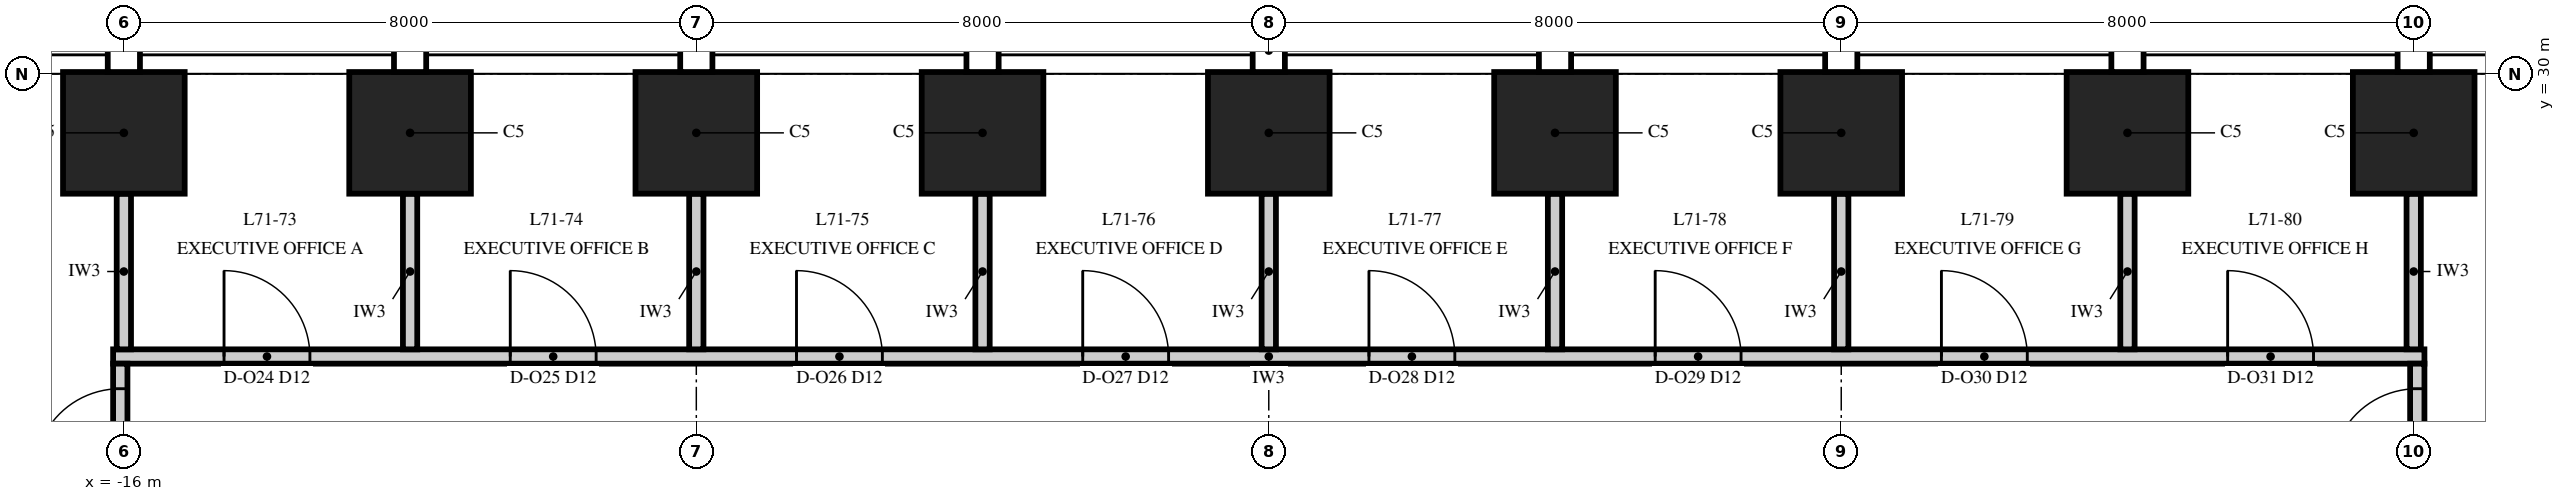
"""IFC4 building model, lengths in metres.
Left out: names, types, materials, properties, quantities, classifications, styles, units other than length and angle.
Written with IfcOpenShell. Run it as: python <this file> out.ifc"""

import sys

from ifc_helpers import new_model, si_unit, direction, frame, frame_2d, origin, origin_2d, place, context, subcontext, project, spatial, rectangle, extrude, element, fill, save


model = new_model("IFC4")
c1 = context("Model", 3, precision=1e-05, world=origin(), true_north=direction((0.0, 1.0)))
c2 = subcontext(c1, "Body", "Model", "MODEL_VIEW")
j1 = project(units=[si_unit("LENGTHUNIT", "METRE"), si_unit("PLANEANGLEUNIT", "RADIAN")], contexts=[c1])
p1 = place(None, origin())
s1 = spatial("IfcSite", under=j1, at=p1, CompositionType="ELEMENT")
p2 = place(p1, origin())
s2 = spatial("IfcBuilding", under=s1, at=p2, CompositionType="ELEMENT")
p3 = place(p2, frame((0.0, 0.0, 304.0)))
s3 = spatial("IfcBuildingStorey", under=s2, at=p3, CompositionType="ELEMENT", Elevation=304.0)
for number, where, z_axis, x_axis in (
    (1, (16.0, 29.175, 0.0), (0.0, 0.0, 1.0), (-1.0, 0.0, 0.0)),
    (2, (12.0, 29.175, 0.0), (0.0, 0.0, 1.0), (-1.0, 0.0, 0.0)),
    (3, (8.0, 29.175, 0.0), (0.0, 0.0, 1.0), (-1.0, 0.0, 0.0)),
    (4, (4.0, 29.175, 0.0), (0.0, 0.0, 1.0), (-1.0, 0.0, 0.0)),
    (5, (0.0, 29.175, 0.0), (0.0, 0.0, 1.0), (-1.0, 0.0, 0.0)),
    (6, (-4.0, 29.175, 0.0), (0.0, 0.0, 1.0), (-1.0, 0.0, 0.0)),
    (7, (-8.0, 29.175, 0.0), (0.0, 0.0, 1.0), (-1.0, 0.0, 0.0)),
    (8, (-12.0, 29.175, 0.0), (0.0, 0.0, 1.0), (-1.0, 0.0, 0.0)),
    (9, (-16.0, 29.175, 0.0), (0.0, 0.0, 1.0), (-1.0, 0.0, 0.0)),
):
    element("IfcColumn", number, at=place(p3, frame(where, z_axis=z_axis, x_axis=x_axis)), inside=s3, PredefinedType="COLUMN", context=c2, shape_type="SweptSolid", body=[
        extrude(rectangle(XDim=1.7, YDim=1.7, at=origin_2d()), origin(), (0.0, 0.0, 1.0), 4.0),
    ])
p4 = place(p3, frame((-16.15, 26.05, 0.0), z_axis=(0.0, 0.0, 1.0), x_axis=(1.0, 0.0, 0.0)))
e10 = element("IfcWall", 10, at=p4, inside=s3, PredefinedType="PARTITIONING", context=c2, shape_type="SweptSolid", body=[
    extrude(rectangle(XDim=32.3, YDim=0.2, at=frame_2d((16.15, 0.0))), origin(), (0.0, 0.0, 1.0), 3.418),
])
p5 = place(p4, frame((1.55, 0.0, 0.0)))
e11 = element("IfcOpeningElement", 11, at=p5, cuts=e10, PredefinedType="OPENING", context=c2, shape_type="SweptSolid", body=[
    extrude(rectangle(XDim=1.2, YDim=2.4, at=frame_2d((0.6, 1.2))), frame((0.0, 0.115, 0.0), z_axis=(0.0, -1.0, 0.0), x_axis=(1.0, 0.0, 0.0)), (0.0, 0.0, 1.0), 0.23),
])
p6 = place(p4, frame((5.55, 0.0, 0.0)))
e12 = element("IfcOpeningElement", 12, at=p6, cuts=e10, PredefinedType="OPENING", context=c2, shape_type="SweptSolid", body=[
    extrude(rectangle(XDim=1.2, YDim=2.4, at=frame_2d((0.6, 1.2))), frame((0.0, 0.115, 0.0), z_axis=(0.0, -1.0, 0.0), x_axis=(1.0, 0.0, 0.0)), (0.0, 0.0, 1.0), 0.23),
])
p7 = place(p4, frame((9.55, 0.0, 0.0)))
e13 = element("IfcOpeningElement", 13, at=p7, cuts=e10, PredefinedType="OPENING", context=c2, shape_type="SweptSolid", body=[
    extrude(rectangle(XDim=1.2, YDim=2.4, at=frame_2d((0.6, 1.2))), frame((0.0, 0.115, 0.0), z_axis=(0.0, -1.0, 0.0), x_axis=(1.0, 0.0, 0.0)), (0.0, 0.0, 1.0), 0.23),
])
p8 = place(p4, frame((13.55, 0.0, 0.0)))
e14 = element("IfcOpeningElement", 14, at=p8, cuts=e10, PredefinedType="OPENING", context=c2, shape_type="SweptSolid", body=[
    extrude(rectangle(XDim=1.2, YDim=2.4, at=frame_2d((0.6, 1.2))), frame((0.0, 0.115, 0.0), z_axis=(0.0, -1.0, 0.0), x_axis=(1.0, 0.0, 0.0)), (0.0, 0.0, 1.0), 0.23),
])
p9 = place(p4, frame((17.55, 0.0, 0.0)))
e15 = element("IfcOpeningElement", 15, at=p9, cuts=e10, PredefinedType="OPENING", context=c2, shape_type="SweptSolid", body=[
    extrude(rectangle(XDim=1.2, YDim=2.4, at=frame_2d((0.6, 1.2))), frame((0.0, 0.115, 0.0), z_axis=(0.0, -1.0, 0.0), x_axis=(1.0, 0.0, 0.0)), (0.0, 0.0, 1.0), 0.23),
])
p10 = place(p4, frame((21.55, 0.0, 0.0)))
e16 = element("IfcOpeningElement", 16, at=p10, cuts=e10, PredefinedType="OPENING", context=c2, shape_type="SweptSolid", body=[
    extrude(rectangle(XDim=1.2, YDim=2.4, at=frame_2d((0.6, 1.2))), frame((0.0, 0.115, 0.0), z_axis=(0.0, -1.0, 0.0), x_axis=(1.0, 0.0, 0.0)), (0.0, 0.0, 1.0), 0.23),
])
p11 = place(p4, frame((25.55, 0.0, 0.0)))
e17 = element("IfcOpeningElement", 17, at=p11, cuts=e10, PredefinedType="OPENING", context=c2, shape_type="SweptSolid", body=[
    extrude(rectangle(XDim=1.2, YDim=2.4, at=frame_2d((0.6, 1.2))), frame((0.0, 0.115, 0.0), z_axis=(0.0, -1.0, 0.0), x_axis=(1.0, 0.0, 0.0)), (0.0, 0.0, 1.0), 0.23),
])
p12 = place(p4, frame((29.55, 0.0, 0.0)))
e18 = element("IfcOpeningElement", 18, at=p12, cuts=e10, PredefinedType="OPENING", context=c2, shape_type="SweptSolid", body=[
    extrude(rectangle(XDim=1.2, YDim=2.4, at=frame_2d((0.6, 1.2))), frame((0.0, 0.115, 0.0), z_axis=(0.0, -1.0, 0.0), x_axis=(1.0, 0.0, 0.0)), (0.0, 0.0, 1.0), 0.23),
])
p13 = place(p3, frame((-16.05, 4.05, 0.0), z_axis=(0.0, 0.0, 1.0), x_axis=(0.0, 1.0, 0.0)))
e19 = element("IfcWall", 19, at=p13, inside=s3, PredefinedType="PARTITIONING", context=c2, shape_type="SweptSolid", body=[
    extrude(rectangle(XDim=21.9, YDim=0.2, at=frame_2d((10.95, 0.0))), origin(), (0.0, 0.0, 1.0), 2.842),
])
p14 = place(p13, frame((0.25, 0.0, 0.0)))
e20 = element("IfcOpeningElement", 20, at=p14, cuts=e19, PredefinedType="OPENING", context=c2, shape_type="SweptSolid", body=[
    extrude(rectangle(XDim=1.2, YDim=2.4, at=frame_2d((0.6, 1.2))), frame((0.0, 0.115, 0.0), z_axis=(0.0, -1.0, 0.0), x_axis=(1.0, 0.0, 0.0)), (0.0, 0.0, 1.0), 0.23),
])
p15 = place(p13, frame((7.35, 0.0, 0.0)))
e21 = element("IfcOpeningElement", 21, at=p15, cuts=e19, PredefinedType="OPENING", context=c2, shape_type="SweptSolid", body=[
    extrude(rectangle(XDim=1.2, YDim=2.4, at=frame_2d((0.6, 1.2))), frame((0.0, 0.115, 0.0), z_axis=(0.0, -1.0, 0.0), x_axis=(1.0, 0.0, 0.0)), (0.0, 0.0, 1.0), 0.23),
])
p16 = place(p13, frame((20.35, 0.0, 0.0)))
e22 = element("IfcOpeningElement", 22, at=p16, cuts=e19, PredefinedType="OPENING", context=c2, shape_type="SweptSolid", body=[
    extrude(rectangle(XDim=1.2, YDim=2.4, at=frame_2d((0.6, 1.2))), frame((0.0, 0.115, 0.0), z_axis=(0.0, -1.0, 0.0), x_axis=(1.0, 0.0, 0.0)), (0.0, 0.0, 1.0), 0.23),
])
for number, where, z_axis, x_axis in (
    (23, (-16.0, 26.15, 0.0), (0.0, 0.0, 1.0), (0.0, 1.0, 0.0)),
    (24, (-12.0, 26.15, 0.0), (0.0, 0.0, 1.0), (0.0, 1.0, 0.0)),
    (25, (-8.0, 26.15, 0.0), (0.0, 0.0, 1.0), (0.0, 1.0, 0.0)),
    (26, (-4.0, 26.15, 0.0), (0.0, 0.0, 1.0), (0.0, 1.0, 0.0)),
    (27, (0.0, 26.15, 0.0), (0.0, 0.0, 1.0), (0.0, 1.0, 0.0)),
    (28, (4.0, 26.15, 0.0), (0.0, 0.0, 1.0), (0.0, 1.0, 0.0)),
    (29, (8.0, 26.15, 0.0), (0.0, 0.0, 1.0), (0.0, 1.0, 0.0)),
    (30, (12.0, 26.15, 0.0), (0.0, 0.0, 1.0), (0.0, 1.0, 0.0)),
    (31, (16.0, 26.15, 0.0), (0.0, 0.0, 1.0), (0.0, 1.0, 0.0)),
):
    element("IfcWall", number, at=place(p3, frame(where, z_axis=z_axis, x_axis=x_axis)), inside=s3, PredefinedType="PARTITIONING", context=c2, shape_type="SweptSolid", body=[
        extrude(rectangle(XDim=2.175, YDim=0.2, at=frame_2d((1.087, 0.0))), origin(), (0.0, 0.0, 1.0), 3.418),
    ])
p17 = place(p3, frame((16.05, 4.05, 0.0), z_axis=(0.0, 0.0, 1.0), x_axis=(0.0, 1.0, 0.0)))
e32 = element("IfcWall", 32, at=p17, inside=s3, PredefinedType="PARTITIONING", context=c2, shape_type="SweptSolid", body=[
    extrude(rectangle(XDim=21.9, YDim=0.2, at=frame_2d((10.95, 0.0))), origin(), (0.0, 0.0, 1.0), 2.842),
])
p18 = place(p17, frame((0.25, 0.0, 0.0)))
e33 = element("IfcOpeningElement", 33, at=p18, cuts=e32, PredefinedType="OPENING", context=c2, shape_type="SweptSolid", body=[
    extrude(rectangle(XDim=1.2, YDim=2.4, at=frame_2d((0.6, 1.2))), frame((0.0, 0.115, 0.0), z_axis=(0.0, -1.0, 0.0), x_axis=(1.0, 0.0, 0.0)), (0.0, 0.0, 1.0), 0.23),
])
p19 = place(p17, frame((7.35, 0.0, 0.0)))
e34 = element("IfcOpeningElement", 34, at=p19, cuts=e32, PredefinedType="OPENING", context=c2, shape_type="SweptSolid", body=[
    extrude(rectangle(XDim=1.2, YDim=2.4, at=frame_2d((0.6, 1.2))), frame((0.0, 0.115, 0.0), z_axis=(0.0, -1.0, 0.0), x_axis=(1.0, 0.0, 0.0)), (0.0, 0.0, 1.0), 0.23),
])
p20 = place(p17, frame((20.35, 0.0, 0.0)))
e35 = element("IfcOpeningElement", 35, at=p20, cuts=e32, PredefinedType="OPENING", context=c2, shape_type="SweptSolid", body=[
    extrude(rectangle(XDim=1.2, YDim=2.4, at=frame_2d((0.6, 1.2))), frame((0.0, 0.115, 0.0), z_axis=(0.0, -1.0, 0.0), x_axis=(1.0, 0.0, 0.0)), (0.0, 0.0, 1.0), 0.23),
])
p21 = place(p5, origin())
e36 = element("IfcDoor", 36, at=p21, inside=s3, OperationType="SINGLE_SWING_LEFT", PredefinedType="DOOR", context=c2, shape_type="SweptSolid", body=[
    extrude(rectangle(XDim=1.2, YDim=2.4, at=frame_2d((0.6, 1.2))), frame((0.0, 0.1, 0.0), z_axis=(0.0, -1.0, 0.0), x_axis=(1.0, 0.0, 0.0)), (0.0, 0.0, 1.0), 0.199),
])
fill(e11, e36)
p22 = place(p6, origin())
e37 = element("IfcDoor", 37, at=p22, inside=s3, OperationType="SINGLE_SWING_LEFT", PredefinedType="DOOR", context=c2, shape_type="SweptSolid", body=[
    extrude(rectangle(XDim=1.2, YDim=2.4, at=frame_2d((0.6, 1.2))), frame((0.0, 0.1, 0.0), z_axis=(0.0, -1.0, 0.0), x_axis=(1.0, 0.0, 0.0)), (0.0, 0.0, 1.0), 0.199),
])
fill(e12, e37)
p23 = place(p7, origin())
e38 = element("IfcDoor", 38, at=p23, inside=s3, OperationType="SINGLE_SWING_LEFT", PredefinedType="DOOR", context=c2, shape_type="SweptSolid", body=[
    extrude(rectangle(XDim=1.2, YDim=2.4, at=frame_2d((0.6, 1.2))), frame((0.0, 0.1, 0.0), z_axis=(0.0, -1.0, 0.0), x_axis=(1.0, 0.0, 0.0)), (0.0, 0.0, 1.0), 0.199),
])
fill(e13, e38)
p24 = place(p8, origin())
e39 = element("IfcDoor", 39, at=p24, inside=s3, OperationType="SINGLE_SWING_LEFT", PredefinedType="DOOR", context=c2, shape_type="SweptSolid", body=[
    extrude(rectangle(XDim=1.2, YDim=2.4, at=frame_2d((0.6, 1.2))), frame((0.0, 0.1, 0.0), z_axis=(0.0, -1.0, 0.0), x_axis=(1.0, 0.0, 0.0)), (0.0, 0.0, 1.0), 0.199),
])
fill(e14, e39)
p25 = place(p9, origin())
e40 = element("IfcDoor", 40, at=p25, inside=s3, OperationType="SINGLE_SWING_LEFT", PredefinedType="DOOR", context=c2, shape_type="SweptSolid", body=[
    extrude(rectangle(XDim=1.2, YDim=2.4, at=frame_2d((0.6, 1.2))), frame((0.0, 0.1, 0.0), z_axis=(0.0, -1.0, 0.0), x_axis=(1.0, 0.0, 0.0)), (0.0, 0.0, 1.0), 0.199),
])
fill(e15, e40)
p26 = place(p10, origin())
e41 = element("IfcDoor", 41, at=p26, inside=s3, OperationType="SINGLE_SWING_LEFT", PredefinedType="DOOR", context=c2, shape_type="SweptSolid", body=[
    extrude(rectangle(XDim=1.2, YDim=2.4, at=frame_2d((0.6, 1.2))), frame((0.0, 0.1, 0.0), z_axis=(0.0, -1.0, 0.0), x_axis=(1.0, 0.0, 0.0)), (0.0, 0.0, 1.0), 0.199),
])
fill(e16, e41)
p27 = place(p11, origin())
e42 = element("IfcDoor", 42, at=p27, inside=s3, OperationType="SINGLE_SWING_LEFT", PredefinedType="DOOR", context=c2, shape_type="SweptSolid", body=[
    extrude(rectangle(XDim=1.2, YDim=2.4, at=frame_2d((0.6, 1.2))), frame((0.0, 0.1, 0.0), z_axis=(0.0, -1.0, 0.0), x_axis=(1.0, 0.0, 0.0)), (0.0, 0.0, 1.0), 0.199),
])
fill(e17, e42)
p28 = place(p12, origin())
e43 = element("IfcDoor", 43, at=p28, inside=s3, OperationType="SINGLE_SWING_LEFT", PredefinedType="DOOR", context=c2, shape_type="SweptSolid", body=[
    extrude(rectangle(XDim=1.2, YDim=2.4, at=frame_2d((0.6, 1.2))), frame((0.0, 0.1, 0.0), z_axis=(0.0, -1.0, 0.0), x_axis=(1.0, 0.0, 0.0)), (0.0, 0.0, 1.0), 0.199),
])
fill(e18, e43)
p29 = place(p16, origin())
e44 = element("IfcDoor", 44, at=p29, inside=s3, OperationType="SINGLE_SWING_LEFT", PredefinedType="DOOR", context=c2, shape_type="SweptSolid", body=[
    extrude(rectangle(XDim=1.2, YDim=2.4, at=frame_2d((0.6, 1.2))), frame((0.0, 0.1, 0.0), z_axis=(0.0, -1.0, 0.0), x_axis=(1.0, 0.0, 0.0)), (0.0, 0.0, 1.0), 0.199),
])
fill(e22, e44)
p30 = place(p20, origin())
e45 = element("IfcDoor", 45, at=p30, inside=s3, OperationType="SINGLE_SWING_LEFT", PredefinedType="DOOR", context=c2, shape_type="SweptSolid", body=[
    extrude(rectangle(XDim=1.2, YDim=2.4, at=frame_2d((0.6, 1.2))), frame((0.0, 0.1, 0.0), z_axis=(0.0, -1.0, 0.0), x_axis=(1.0, 0.0, 0.0)), (0.0, 0.0, 1.0), 0.199),
])
fill(e35, e45)
save(model, sys.argv[1])
